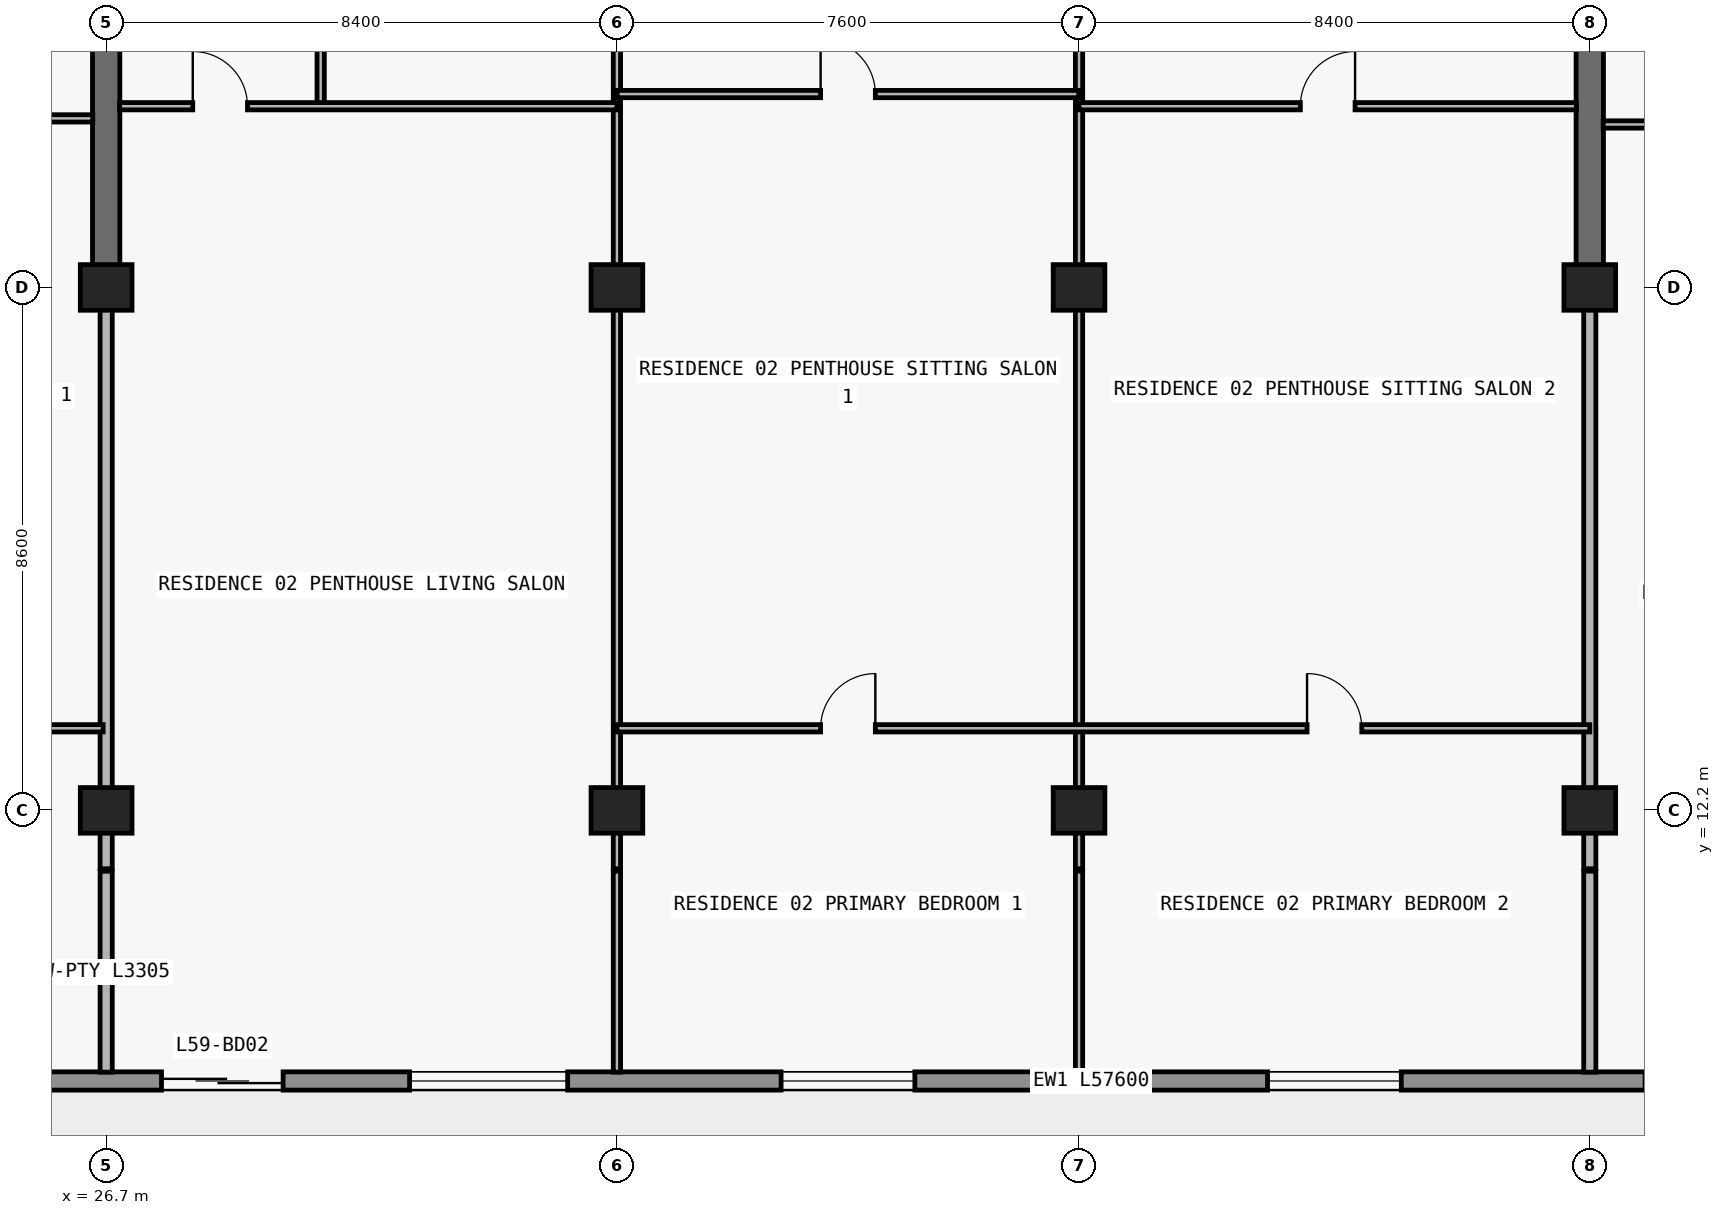
"""IFC4 building model, lengths in metres.
Left out: names, types, materials, properties, quantities, classifications, styles, units other than length and angle.
Written with IfcOpenShell. Run it as: python <this file> out.ifc"""

import sys

from ifc_helpers import new_model, si_unit, direction, frame, frame_2d, origin, origin_2d, place, context, subcontext, project, spatial, rectangle, extrude, element, fill, save


model = new_model("IFC4")
c1 = context("Model", 3, precision=1e-05, world=origin(), true_north=direction((0.0, 1.0)))
c2 = subcontext(c1, "Body", "Model", "MODEL_VIEW")
j1 = project(units=[si_unit("LENGTHUNIT", "METRE"), si_unit("PLANEANGLEUNIT", "RADIAN")], contexts=[c1])
p1 = place(None, origin())
s1 = spatial("IfcSite", under=j1, at=p1, CompositionType="ELEMENT")
p2 = place(p1, origin())
s2 = spatial("IfcBuilding", under=s1, at=p2, CompositionType="ELEMENT")
p3 = place(p2, frame((0.0, 0.0, 211.5)))
s3 = spatial("IfcBuildingStorey", under=s2, at=p3, CompositionType="ELEMENT", Elevation=211.5)
for number, where, z_axis, x_axis in (
    (1, (26.7, 12.2, 0.0), (0.0, 0.0, 1.0), (1.0, 0.0, 0.0)),
    (2, (35.1, 12.2, 0.0), (0.0, 0.0, 1.0), (1.0, 0.0, 0.0)),
    (3, (42.7, 12.2, 0.0), (0.0, 0.0, 1.0), (1.0, 0.0, 0.0)),
    (4, (51.1, 12.2, 0.0), (0.0, 0.0, 1.0), (1.0, 0.0, 0.0)),
    (5, (26.7, 20.8, 0.0), (0.0, 0.0, 1.0), (1.0, 0.0, 0.0)),
    (6, (35.1, 20.8, 0.0), (0.0, 0.0, 1.0), (1.0, 0.0, 0.0)),
    (7, (42.7, 20.8, 0.0), (0.0, 0.0, 1.0), (1.0, 0.0, 0.0)),
    (8, (51.1, 20.8, 0.0), (0.0, 0.0, 1.0), (1.0, 0.0, 0.0)),
):
    element("IfcColumn", number, at=place(p3, frame(where, z_axis=z_axis, x_axis=x_axis)), inside=s3, PredefinedType="COLUMN", context=c2, shape_type="SweptSolid", body=[
        extrude(rectangle(XDim=0.85, YDim=0.75, at=origin_2d()), origin(), (0.0, 0.0, 1.0), 3.05),
    ])
for number, where, z_axis, x_axis in (
    (9, (26.7, 20.8, 0.0), (0.0, 0.0, 1.0), (0.0, 1.0, 0.0)),
    (10, (51.1, 20.8, 0.0), (0.0, 0.0, 1.0), (0.0, 1.0, 0.0)),
):
    element("IfcWall", number, at=place(p3, frame(where, z_axis=z_axis, x_axis=x_axis)), inside=s3, PredefinedType="SHEAR", context=c2, shape_type="SweptSolid", body=[
        extrude(rectangle(XDim=8.6, YDim=0.45, at=frame_2d((4.3, 0.0))), origin(), (0.0, 0.0, 1.0), 3.05),
    ])
p4 = place(p3, frame((67.7, 7.75, 0.0), z_axis=(0.0, 0.0, 1.0), x_axis=(-1.0, 0.0, 0.0)))
e11 = element("IfcWall", 11, at=p4, inside=s3, PredefinedType="STANDARD", context=c2, shape_type="SweptSolid", body=[
    extrude(rectangle(XDim=57.6, YDim=0.3, at=frame_2d((28.8, 0.0))), origin(), (0.0, 0.0, 1.0), 3.05),
])
p5 = place(p4, frame((54.69, 0.0, 0.0)))
e12 = element("IfcOpeningElement", 12, at=p5, cuts=e11, PredefinedType="OPENING", context=c2, shape_type="SweptSolid", body=[
    extrude(rectangle(XDim=2.0, YDim=2.3, at=frame_2d((1.0, 1.15))), frame((0.0, 0.16, 0.0), z_axis=(0.0, -1.0, 0.0), x_axis=(1.0, 0.0, 0.0)), (0.0, 0.0, 1.0), 0.32),
])
p6 = place(p4, frame((50.21, 0.0, 0.65)))
e13 = element("IfcOpeningElement", 13, at=p6, cuts=e11, PredefinedType="OPENING", context=c2, shape_type="SweptSolid", body=[
    extrude(rectangle(XDim=2.6, YDim=1.85, at=frame_2d((1.3, 0.925))), frame((0.0, 0.16, 0.0), z_axis=(0.0, -1.0, 0.0), x_axis=(1.0, 0.0, 0.0)), (0.0, 0.0, 1.0), 0.32),
])
p7 = place(p4, frame((44.1, 0.0, 0.85)))
e14 = element("IfcOpeningElement", 14, at=p7, cuts=e11, PredefinedType="OPENING", context=c2, shape_type="SweptSolid", body=[
    extrude(rectangle(XDim=2.2, YDim=1.55, at=frame_2d((1.1, 0.775))), frame((0.0, 0.16, 0.0), z_axis=(0.0, -1.0, 0.0), x_axis=(1.0, 0.0, 0.0)), (0.0, 0.0, 1.0), 0.32),
])
p8 = place(p4, frame((38.09, 0.0, 0.0)))
e15 = element("IfcOpeningElement", 15, at=p8, cuts=e11, PredefinedType="OPENING", context=c2, shape_type="SweptSolid", body=[
    extrude(rectangle(XDim=2.0, YDim=2.3, at=frame_2d((1.0, 1.15))), frame((0.0, 0.16, 0.0), z_axis=(0.0, -1.0, 0.0), x_axis=(1.0, 0.0, 0.0)), (0.0, 0.0, 1.0), 0.32),
])
p9 = place(p4, frame((33.41, 0.0, 0.65)))
e16 = element("IfcOpeningElement", 16, at=p9, cuts=e11, PredefinedType="OPENING", context=c2, shape_type="SweptSolid", body=[
    extrude(rectangle(XDim=2.6, YDim=1.85, at=frame_2d((1.3, 0.925))), frame((0.0, 0.16, 0.0), z_axis=(0.0, -1.0, 0.0), x_axis=(1.0, 0.0, 0.0)), (0.0, 0.0, 1.0), 0.32),
])
p10 = place(p4, frame((27.7, 0.0, 0.85)))
e17 = element("IfcOpeningElement", 17, at=p10, cuts=e11, PredefinedType="OPENING", context=c2, shape_type="SweptSolid", body=[
    extrude(rectangle(XDim=2.2, YDim=1.55, at=frame_2d((1.1, 0.775))), frame((0.0, 0.16, 0.0), z_axis=(0.0, -1.0, 0.0), x_axis=(1.0, 0.0, 0.0)), (0.0, 0.0, 1.0), 0.32),
])
p11 = place(p4, frame((19.7, 0.0, 0.85)))
e18 = element("IfcOpeningElement", 18, at=p11, cuts=e11, PredefinedType="OPENING", context=c2, shape_type="SweptSolid", body=[
    extrude(rectangle(XDim=2.2, YDim=1.55, at=frame_2d((1.1, 0.775))), frame((0.0, 0.16, 0.0), z_axis=(0.0, -1.0, 0.0), x_axis=(1.0, 0.0, 0.0)), (0.0, 0.0, 1.0), 0.32),
])
p12 = place(p4, frame((13.69, 0.0, 0.0)))
e19 = element("IfcOpeningElement", 19, at=p12, cuts=e11, PredefinedType="OPENING", context=c2, shape_type="SweptSolid", body=[
    extrude(rectangle(XDim=2.0, YDim=2.3, at=frame_2d((1.0, 1.15))), frame((0.0, 0.16, 0.0), z_axis=(0.0, -1.0, 0.0), x_axis=(1.0, 0.0, 0.0)), (0.0, 0.0, 1.0), 0.32),
])
p13 = place(p4, frame((9.01, 0.0, 0.65)))
e20 = element("IfcOpeningElement", 20, at=p13, cuts=e11, PredefinedType="OPENING", context=c2, shape_type="SweptSolid", body=[
    extrude(rectangle(XDim=2.6, YDim=1.85, at=frame_2d((1.3, 0.925))), frame((0.0, 0.16, 0.0), z_axis=(0.0, -1.0, 0.0), x_axis=(1.0, 0.0, 0.0)), (0.0, 0.0, 1.0), 0.32),
])
p14 = place(p4, frame((3.0, 0.0, 0.85)))
e21 = element("IfcOpeningElement", 21, at=p14, cuts=e11, PredefinedType="OPENING", context=c2, shape_type="SweptSolid", body=[
    extrude(rectangle(XDim=2.2, YDim=1.55, at=frame_2d((1.1, 0.775))), frame((0.0, 0.16, 0.0), z_axis=(0.0, -1.0, 0.0), x_axis=(1.0, 0.0, 0.0)), (0.0, 0.0, 1.0), 0.32),
])
p15 = place(p3, frame((26.7, 7.895, 0.0), z_axis=(0.0, 0.0, 1.0), x_axis=(0.0, 1.0, 0.0)))
e22 = element("IfcWall", 22, at=p15, inside=s3, PredefinedType="PARTITIONING", context=c2, shape_type="SweptSolid", body=[
    extrude(rectangle(XDim=3.305, YDim=0.2, at=frame_2d((1.652, 0.0))), origin(), (0.0, 0.0, 1.0), 3.05),
])
p16 = place(p3, frame((26.7, 11.24, 0.0), z_axis=(0.0, 0.0, 1.0), x_axis=(0.0, 1.0, 0.0)))
e23 = element("IfcWall", 23, at=p16, inside=s3, PredefinedType="PARTITIONING", context=c2, shape_type="SweptSolid", body=[
    extrude(rectangle(XDim=9.555, YDim=0.2, at=frame_2d((4.777, 0.0))), origin(), (0.0, 0.0, 1.0), 2.263),
])
p17 = place(p3, frame((30.228, 23.78, 0.0), z_axis=(0.0, 0.0, 1.0), x_axis=(0.0, 1.0, 0.0)))
e24 = element("IfcWall", 24, at=p17, inside=s3, PredefinedType="PARTITIONING", context=c2, shape_type="SweptSolid", body=[
    extrude(rectangle(XDim=4.8, YDim=0.12, at=frame_2d((2.4, 0.0))), origin(), (0.0, 0.0, 1.0), 3.05),
])
p18 = place(p17, frame((1.95, 0.0, 0.0)))
e25 = element("IfcOpeningElement", 25, at=p18, cuts=e24, PredefinedType="OPENING", context=c2, shape_type="SweptSolid", body=[
    extrude(rectangle(XDim=0.9, YDim=2.15, at=frame_2d((0.45, 1.075))), frame((0.0, 0.07, 0.0), z_axis=(0.0, -1.0, 0.0), x_axis=(1.0, 0.0, 0.0)), (0.0, 0.0, 1.0), 0.14),
])
p19 = place(p3, frame((35.1, 7.895, 0.0), z_axis=(0.0, 0.0, 1.0), x_axis=(0.0, 1.0, 0.0)))
e26 = element("IfcWall", 26, at=p19, inside=s3, PredefinedType="PARTITIONING", context=c2, shape_type="SweptSolid", body=[
    extrude(rectangle(XDim=3.305, YDim=0.12, at=frame_2d((1.652, 0.0))), origin(), (0.0, 0.0, 1.0), 3.05),
])
p20 = place(p3, frame((35.1, 11.24, 0.0), z_axis=(0.0, 0.0, 1.0), x_axis=(0.0, 1.0, 0.0)))
e27 = element("IfcWall", 27, at=p20, inside=s3, PredefinedType="PARTITIONING", context=c2, shape_type="SweptSolid", body=[
    extrude(rectangle(XDim=22.76, YDim=0.12, at=frame_2d((11.38, 0.0))), origin(), (0.0, 0.0, 1.0), 2.263),
])
p21 = place(p20, frame((14.49, 0.0, 0.0)))
e28 = element("IfcOpeningElement", 28, at=p21, cuts=e27, PredefinedType="OPENING", context=c2, shape_type="SweptSolid", body=[
    extrude(rectangle(XDim=0.9, YDim=2.15, at=frame_2d((0.45, 1.075))), frame((0.0, 0.07, 0.0), z_axis=(0.0, -1.0, 0.0), x_axis=(1.0, 0.0, 0.0)), (0.0, 0.0, 1.0), 0.14),
])
p22 = place(p3, frame((42.7, 7.895, 0.0), z_axis=(0.0, 0.0, 1.0), x_axis=(0.0, 1.0, 0.0)))
e29 = element("IfcWall", 29, at=p22, inside=s3, PredefinedType="PARTITIONING", context=c2, shape_type="SweptSolid", body=[
    extrude(rectangle(XDim=3.305, YDim=0.12, at=frame_2d((1.652, 0.0))), origin(), (0.0, 0.0, 1.0), 3.05),
])
p23 = place(p3, frame((42.7, 11.24, 0.0), z_axis=(0.0, 0.0, 1.0), x_axis=(0.0, 1.0, 0.0)))
e30 = element("IfcWall", 30, at=p23, inside=s3, PredefinedType="PARTITIONING", context=c2, shape_type="SweptSolid", body=[
    extrude(rectangle(XDim=22.76, YDim=0.12, at=frame_2d((11.38, 0.0))), origin(), (0.0, 0.0, 1.0), 2.263),
])
p24 = place(p23, frame((14.49, 0.0, 0.0)))
e31 = element("IfcOpeningElement", 31, at=p24, cuts=e30, PredefinedType="OPENING", context=c2, shape_type="SweptSolid", body=[
    extrude(rectangle(XDim=0.9, YDim=2.15, at=frame_2d((0.45, 1.075))), frame((0.0, 0.07, 0.0), z_axis=(0.0, -1.0, 0.0), x_axis=(1.0, 0.0, 0.0)), (0.0, 0.0, 1.0), 0.14),
])
p25 = place(p3, frame((51.1, 7.895, 0.0), z_axis=(0.0, 0.0, 1.0), x_axis=(0.0, 1.0, 0.0)))
e32 = element("IfcWall", 32, at=p25, inside=s3, PredefinedType="PARTITIONING", context=c2, shape_type="SweptSolid", body=[
    extrude(rectangle(XDim=3.305, YDim=0.2, at=frame_2d((1.652, 0.0))), origin(), (0.0, 0.0, 1.0), 3.05),
])
p26 = place(p3, frame((51.1, 11.24, 0.0), z_axis=(0.0, 0.0, 1.0), x_axis=(0.0, 1.0, 0.0)))
e33 = element("IfcWall", 33, at=p26, inside=s3, PredefinedType="PARTITIONING", context=c2, shape_type="SweptSolid", body=[
    extrude(rectangle(XDim=9.555, YDim=0.2, at=frame_2d((4.777, 0.0))), origin(), (0.0, 0.0, 1.0), 2.263),
])
p27 = place(p3, frame((18.3, 13.55, 0.0), z_axis=(0.0, 0.0, 1.0), x_axis=(1.0, 0.0, 0.0)))
e34 = element("IfcWall", 34, at=p27, inside=s3, PredefinedType="PARTITIONING", context=c2, shape_type="SweptSolid", body=[
    extrude(rectangle(XDim=8.35, YDim=0.12, at=frame_2d((4.175, 0.0))), origin(), (0.0, 0.0, 1.0), 3.05),
])
p28 = place(p27, frame((3.725, 0.0, 0.0)))
e35 = element("IfcOpeningElement", 35, at=p28, cuts=e34, PredefinedType="OPENING", context=c2, shape_type="SweptSolid", body=[
    extrude(rectangle(XDim=0.9, YDim=2.15, at=frame_2d((0.45, 1.075))), frame((0.0, 0.07, 0.0), z_axis=(0.0, -1.0, 0.0), x_axis=(1.0, 0.0, 0.0)), (0.0, 0.0, 1.0), 0.14),
])
p29 = place(p3, frame((35.1, 13.55, 0.0), z_axis=(0.0, 0.0, 1.0), x_axis=(1.0, 0.0, 0.0)))
e36 = element("IfcWall", 36, at=p29, inside=s3, PredefinedType="PARTITIONING", context=c2, shape_type="SweptSolid", body=[
    extrude(rectangle(XDim=16.0, YDim=0.12, at=frame_2d((8.0, 0.0))), origin(), (0.0, 0.0, 1.0), 3.05),
])
p30 = place(p29, frame((3.35, 0.0, 0.0)))
e37 = element("IfcOpeningElement", 37, at=p30, cuts=e36, PredefinedType="OPENING", context=c2, shape_type="SweptSolid", body=[
    extrude(rectangle(XDim=0.9, YDim=2.15, at=frame_2d((0.45, 1.075))), frame((0.0, 0.07, 0.0), z_axis=(0.0, -1.0, 0.0), x_axis=(1.0, 0.0, 0.0)), (0.0, 0.0, 1.0), 0.14),
])
p31 = place(p29, frame((11.35, 0.0, 0.0)))
e38 = element("IfcOpeningElement", 38, at=p31, cuts=e36, PredefinedType="OPENING", context=c2, shape_type="SweptSolid", body=[
    extrude(rectangle(XDim=0.9, YDim=2.15, at=frame_2d((0.45, 1.075))), frame((0.0, 0.07, 0.0), z_axis=(0.0, -1.0, 0.0), x_axis=(1.0, 0.0, 0.0)), (0.0, 0.0, 1.0), 0.14),
])
p32 = place(p3, frame((51.32, 23.48, 0.0), z_axis=(0.0, 0.0, 1.0), x_axis=(1.0, 0.0, 0.0)))
e39 = element("IfcWall", 39, at=p32, inside=s3, PredefinedType="PARTITIONING", context=c2, shape_type="SweptSolid", body=[
    extrude(rectangle(XDim=8.18, YDim=0.12, at=frame_2d((4.09, 0.0))), origin(), (0.0, 0.0, 1.0), 3.05),
])
p33 = place(p32, frame((1.33, 0.0, 0.0)))
e40 = element("IfcOpeningElement", 40, at=p33, cuts=e39, PredefinedType="OPENING", context=c2, shape_type="SweptSolid", body=[
    extrude(rectangle(XDim=0.9, YDim=2.15, at=frame_2d((0.45, 1.075))), frame((0.0, 0.07, 0.0), z_axis=(0.0, -1.0, 0.0), x_axis=(1.0, 0.0, 0.0)), (0.0, 0.0, 1.0), 0.14),
])
p34 = place(p3, frame((18.305, 23.58, 0.0), z_axis=(0.0, 0.0, 1.0), x_axis=(1.0, 0.0, 0.0)))
e41 = element("IfcWall", 41, at=p34, inside=s3, PredefinedType="PARTITIONING", context=c2, shape_type="SweptSolid", body=[
    extrude(rectangle(XDim=8.175, YDim=0.12, at=frame_2d((4.087, 0.0))), origin(), (0.0, 0.0, 1.0), 3.05),
])
p35 = place(p34, frame((3.637, 0.0, 0.0)))
e42 = element("IfcOpeningElement", 42, at=p35, cuts=e41, PredefinedType="OPENING", context=c2, shape_type="SweptSolid", body=[
    extrude(rectangle(XDim=0.9, YDim=2.15, at=frame_2d((0.45, 1.075))), frame((0.0, 0.07, 0.0), z_axis=(0.0, -1.0, 0.0), x_axis=(1.0, 0.0, 0.0)), (0.0, 0.0, 1.0), 0.14),
])
p36 = place(p3, frame((26.92, 23.78, 0.0), z_axis=(0.0, 0.0, 1.0), x_axis=(1.0, 0.0, 0.0)))
e43 = element("IfcWall", 43, at=p36, inside=s3, PredefinedType="PARTITIONING", context=c2, shape_type="SweptSolid", body=[
    extrude(rectangle(XDim=8.18, YDim=0.12, at=frame_2d((4.09, 0.0))), origin(), (0.0, 0.0, 1.0), 3.05),
])
p37 = place(p36, frame((1.204, 0.0, 0.0)))
e44 = element("IfcOpeningElement", 44, at=p37, cuts=e43, PredefinedType="OPENING", context=c2, shape_type="SweptSolid", body=[
    extrude(rectangle(XDim=0.9, YDim=2.15, at=frame_2d((0.45, 1.075))), frame((0.0, 0.07, 0.0), z_axis=(0.0, -1.0, 0.0), x_axis=(1.0, 0.0, 0.0)), (0.0, 0.0, 1.0), 0.14),
])
p38 = place(p3, frame((42.7, 23.78, 0.0), z_axis=(0.0, 0.0, 1.0), x_axis=(1.0, 0.0, 0.0)))
e45 = element("IfcWall", 45, at=p38, inside=s3, PredefinedType="PARTITIONING", context=c2, shape_type="SweptSolid", body=[
    extrude(rectangle(XDim=8.18, YDim=0.12, at=frame_2d((4.09, 0.0))), origin(), (0.0, 0.0, 1.0), 3.05),
])
p39 = place(p38, frame((3.64, 0.0, 0.0)))
e46 = element("IfcOpeningElement", 46, at=p39, cuts=e45, PredefinedType="OPENING", context=c2, shape_type="SweptSolid", body=[
    extrude(rectangle(XDim=0.9, YDim=2.15, at=frame_2d((0.45, 1.075))), frame((0.0, 0.07, 0.0), z_axis=(0.0, -1.0, 0.0), x_axis=(1.0, 0.0, 0.0)), (0.0, 0.0, 1.0), 0.14),
])
p40 = place(p3, frame((35.105, 23.98, 0.0), z_axis=(0.0, 0.0, 1.0), x_axis=(1.0, 0.0, 0.0)))
e47 = element("IfcWall", 47, at=p40, inside=s3, PredefinedType="PARTITIONING", context=c2, shape_type="SweptSolid", body=[
    extrude(rectangle(XDim=7.59, YDim=0.12, at=frame_2d((3.795, 0.0))), origin(), (0.0, 0.0, 1.0), 3.05),
])
p41 = place(p40, frame((3.345, 0.0, 0.0)))
e48 = element("IfcOpeningElement", 48, at=p41, cuts=e47, PredefinedType="OPENING", context=c2, shape_type="SweptSolid", body=[
    extrude(rectangle(XDim=0.9, YDim=2.15, at=frame_2d((0.45, 1.075))), frame((0.0, 0.07, 0.0), z_axis=(0.0, -1.0, 0.0), x_axis=(1.0, 0.0, 0.0)), (0.0, 0.0, 1.0), 0.14),
])
p42 = place(p8, origin())
e49 = element("IfcDoor", 49, at=p42, inside=s3, OperationType="DOUBLE_DOOR_SLIDING", PredefinedType="DOOR", context=c2, shape_type="SweptSolid", body=[
    extrude(rectangle(XDim=2.0, YDim=2.3, at=frame_2d((1.0, 1.15))), frame((0.0, 0.025, 0.0), z_axis=(0.0, -1.0, 0.0), x_axis=(1.0, 0.0, 0.0)), (0.0, 0.0, 1.0), 0.05),
])
fill(e15, e49)
p43 = place(p9, origin())
e50 = element("IfcWindow", 50, at=p43, inside=s3, PartitioningType="SINGLE_PANEL", PredefinedType="WINDOW", context=c2, shape_type="SweptSolid", body=[
    extrude(rectangle(XDim=2.6, YDim=1.85, at=frame_2d((1.3, 0.925))), frame((0.0, 0.03, 0.0), z_axis=(0.0, -1.0, 0.0), x_axis=(1.0, 0.0, 0.0)), (0.0, 0.0, 1.0), 0.06),
])
fill(e16, e50)
p44 = place(p10, origin())
e51 = element("IfcWindow", 51, at=p44, inside=s3, PartitioningType="SINGLE_PANEL", PredefinedType="WINDOW", context=c2, shape_type="SweptSolid", body=[
    extrude(rectangle(XDim=2.2, YDim=1.55, at=frame_2d((1.1, 0.775))), frame((0.0, 0.03, 0.0), z_axis=(0.0, -1.0, 0.0), x_axis=(1.0, 0.0, 0.0)), (0.0, 0.0, 1.0), 0.06),
])
fill(e17, e51)
p45 = place(p11, origin())
e52 = element("IfcWindow", 52, at=p45, inside=s3, PartitioningType="SINGLE_PANEL", PredefinedType="WINDOW", context=c2, shape_type="SweptSolid", body=[
    extrude(rectangle(XDim=2.2, YDim=1.55, at=frame_2d((1.1, 0.775))), frame((0.0, 0.03, 0.0), z_axis=(0.0, -1.0, 0.0), x_axis=(1.0, 0.0, 0.0)), (0.0, 0.0, 1.0), 0.06),
])
fill(e18, e52)
p46 = place(p37, origin())
e53 = element("IfcDoor", 53, at=p46, inside=s3, OperationType="SINGLE_SWING_LEFT", PredefinedType="DOOR", context=c2, shape_type="SweptSolid", body=[
    extrude(rectangle(XDim=0.9, YDim=2.15, at=frame_2d((0.45, 1.075))), frame((0.0, 0.025, 0.0), z_axis=(0.0, -1.0, 0.0), x_axis=(1.0, 0.0, 0.0)), (0.0, 0.0, 1.0), 0.05),
])
fill(e44, e53)
p47 = place(p41, origin())
e54 = element("IfcDoor", 54, at=p47, inside=s3, OperationType="SINGLE_SWING_LEFT", PredefinedType="DOOR", context=c2, shape_type="SweptSolid", body=[
    extrude(rectangle(XDim=0.9, YDim=2.15, at=frame_2d((0.45, 1.075))), frame((0.0, 0.025, 0.0), z_axis=(0.0, -1.0, 0.0), x_axis=(1.0, 0.0, 0.0)), (0.0, 0.0, 1.0), 0.05),
])
fill(e48, e54)
p48 = place(p30, origin())
e55 = element("IfcDoor", 55, at=p48, inside=s3, OperationType="SINGLE_SWING_RIGHT", PredefinedType="DOOR", context=c2, shape_type="SweptSolid", body=[
    extrude(rectangle(XDim=0.9, YDim=2.15, at=frame_2d((0.45, 1.075))), frame((0.0, 0.025, 0.0), z_axis=(0.0, -1.0, 0.0), x_axis=(1.0, 0.0, 0.0)), (0.0, 0.0, 1.0), 0.05),
])
fill(e37, e55)
p49 = place(p39, origin())
e56 = element("IfcDoor", 56, at=p49, inside=s3, OperationType="SINGLE_SWING_RIGHT", PredefinedType="DOOR", context=c2, shape_type="SweptSolid", body=[
    extrude(rectangle(XDim=0.9, YDim=2.15, at=frame_2d((0.45, 1.075))), frame((0.0, 0.025, 0.0), z_axis=(0.0, -1.0, 0.0), x_axis=(1.0, 0.0, 0.0)), (0.0, 0.0, 1.0), 0.05),
])
fill(e46, e56)
p50 = place(p31, origin())
e57 = element("IfcDoor", 57, at=p50, inside=s3, OperationType="SINGLE_SWING_LEFT", PredefinedType="DOOR", context=c2, shape_type="SweptSolid", body=[
    extrude(rectangle(XDim=0.9, YDim=2.15, at=frame_2d((0.45, 1.075))), frame((0.0, 0.025, 0.0), z_axis=(0.0, -1.0, 0.0), x_axis=(1.0, 0.0, 0.0)), (0.0, 0.0, 1.0), 0.05),
])
fill(e38, e57)
save(model, sys.argv[1])
